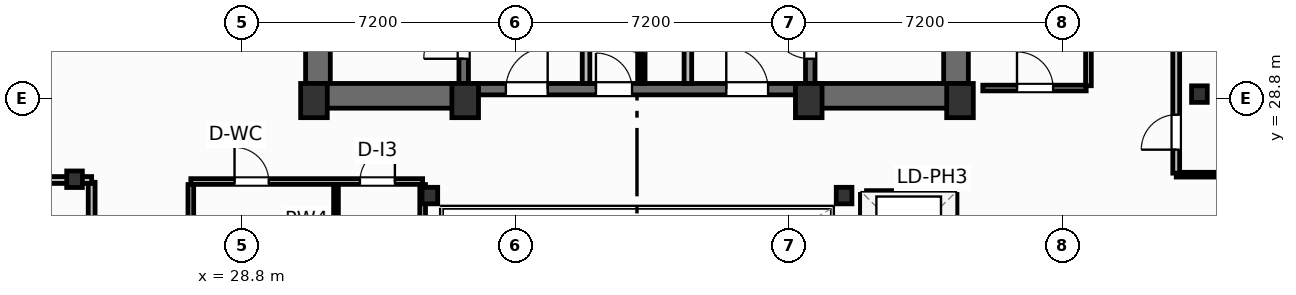
"""IFC4 building model, lengths in metres.
Left out: names, types, materials, properties, quantities, classifications, styles, units other than length and angle.
Written with IfcOpenShell. Run it as: python <this file> out.ifc"""

import sys

from ifc_helpers import new_model, si_unit, direction, frame, frame_2d, origin, origin_2d, place, context, subcontext, project, spatial, rectangle, i_section, extrude, element, fill, save


model = new_model("IFC4")
c1 = context("Model", 3, precision=1e-05, world=origin(), true_north=direction((0.0, 1.0)))
c2 = subcontext(c1, "Body", "Model", "MODEL_VIEW")
j1 = project(units=[si_unit("LENGTHUNIT", "METRE"), si_unit("PLANEANGLEUNIT", "RADIAN")], contexts=[c1])
p1 = place(None, origin())
s1 = spatial("IfcSite", under=j1, at=p1, CompositionType="ELEMENT")
p2 = place(p1, origin())
s2 = spatial("IfcBuilding", under=s1, at=p2, CompositionType="ELEMENT")
p3 = place(p2, frame((0.0, 0.0, 242.3)))
s3 = spatial("IfcBuildingStorey", under=s2, at=p3, CompositionType="ELEMENT", Elevation=242.3)
for number, where, z_axis, x_axis in (
    (1, (30.7, 28.75, 0.0), (0.0, 0.0, 1.0), (1.0, 0.0, 0.0)),
    (2, (34.68, 28.75, 0.0), (0.0, 0.0, 1.0), (1.0, 0.0, 0.0)),
    (3, (43.72, 28.75, 0.0), (0.0, 0.0, 1.0), (1.0, 0.0, 0.0)),
    (4, (47.7, 28.75, 0.0), (0.0, 0.0, 1.0), (1.0, 0.0, 0.0)),
):
    element("IfcColumn", number, at=place(p3, frame(where, z_axis=z_axis, x_axis=x_axis)), inside=s3, PredefinedType="COLUMN", context=c2, shape_type="SweptSolid", body=[
        extrude(rectangle(XDim=0.7, YDim=0.9, at=origin_2d()), origin(), (0.0, 0.0, 1.0), 3.7),
    ])
for number, where, z_axis, x_axis in (
    (5, (33.75, 26.25, 0.0), (0.0, 0.0, 1.0), (1.0, 0.0, 0.0)),
    (6, (44.65, 26.25, 0.0), (0.0, 0.0, 1.0), (1.0, 0.0, 0.0)),
    (7, (24.4, 26.68, 0.0), (0.0, 0.0, 1.0), (1.0, 0.0, 0.0)),
    (8, (54.0, 28.92, 0.0), (0.0, 0.0, 1.0), (1.0, 0.0, 0.0)),
):
    element("IfcColumn", number, at=place(p3, frame(where, z_axis=z_axis, x_axis=x_axis)), inside=s3, PredefinedType="COLUMN", context=c2, shape_type="SweptSolid", body=[
        extrude(i_section(OverallWidth=0.412, OverallDepth=0.435, WebThickness=0.036, FlangeThickness=0.057, FilletRadius=0.025, at=origin_2d()), origin(), (0.0, 0.0, 1.0), 3.7),
    ])
for number, where, z_axis, x_axis in (
    (9, (30.805, 29.2, 0.0), (0.0, 0.0, 1.0), (0.0, 1.0, 0.0)),
    (10, (47.595, 29.2, 0.0), (0.0, 0.0, 1.0), (0.0, 1.0, 0.0)),
):
    element("IfcWall", number, at=place(p3, frame(where, z_axis=z_axis, x_axis=x_axis)), inside=s3, PredefinedType="SHEAR", context=c2, shape_type="SweptSolid", body=[
        extrude(rectangle(XDim=9.22, YDim=0.65, at=frame_2d((4.61, 0.0))), origin(), (0.0, 0.0, 1.0), 3.45),
    ])
p4 = place(p3, frame((30.48, 28.875, 0.0), z_axis=(0.0, 0.0, 1.0), x_axis=(1.0, 0.0, 0.0)))
e11 = element("IfcWall", 11, at=p4, inside=s3, PredefinedType="SHEAR", context=c2, shape_type="SweptSolid", body=[
    extrude(rectangle(XDim=4.32, YDim=0.65, at=frame_2d((2.16, 0.0))), origin(), (0.0, 0.0, 1.0), 3.45),
])
p5 = place(p3, frame((43.6, 28.875, 0.0), z_axis=(0.0, 0.0, 1.0), x_axis=(1.0, 0.0, 0.0)))
e12 = element("IfcWall", 12, at=p5, inside=s3, PredefinedType="SHEAR", context=c2, shape_type="SweptSolid", body=[
    extrude(rectangle(XDim=4.32, YDim=0.65, at=frame_2d((2.16, 0.0))), origin(), (0.0, 0.0, 1.0), 3.45),
])
p6 = place(p3, frame((34.8, 29.05, 0.0), z_axis=(0.0, 0.0, 1.0), x_axis=(1.0, 0.0, 0.0)))
e13 = element("IfcWall", 13, at=p6, inside=s3, PredefinedType="SHEAR", context=c2, shape_type="SweptSolid", body=[
    extrude(rectangle(XDim=8.8, YDim=0.3, at=frame_2d((4.4, 0.0))), origin(), (0.0, 0.0, 1.0), 3.45),
])
p7 = place(p6, frame((0.95, 0.0, 0.0)))
e14 = element("IfcOpeningElement", 14, at=p7, cuts=e13, PredefinedType="OPENING", context=c2, shape_type="SweptSolid", body=[
    extrude(rectangle(XDim=1.1, YDim=2.15, at=frame_2d((0.55, 1.075))), frame((0.0, 0.16, 0.0), z_axis=(0.0, -1.0, 0.0), x_axis=(1.0, 0.0, 0.0)), (0.0, 0.0, 1.0), 0.32),
])
p8 = place(p6, frame((6.75, 0.0, 0.0)))
e15 = element("IfcOpeningElement", 15, at=p8, cuts=e13, PredefinedType="OPENING", context=c2, shape_type="SweptSolid", body=[
    extrude(rectangle(XDim=1.1, YDim=2.15, at=frame_2d((0.55, 1.075))), frame((0.0, 0.16, 0.0), z_axis=(0.0, -1.0, 0.0), x_axis=(1.0, 0.0, 0.0)), (0.0, 0.0, 1.0), 0.32),
])
p9 = place(p6, frame((3.32, 0.0, 0.0)))
e16 = element("IfcOpeningElement", 16, at=p9, cuts=e13, PredefinedType="OPENING", context=c2, shape_type="SweptSolid", body=[
    extrude(rectangle(XDim=0.95, YDim=2.15, at=frame_2d((0.475, 1.075))), frame((0.0, 0.16, 0.0), z_axis=(0.0, -1.0, 0.0), x_axis=(1.0, 0.0, 0.0)), (0.0, 0.0, 1.0), 0.32),
])
p10 = place(p3, frame((34.64, 29.2, 0.0), z_axis=(0.0, 0.0, 1.0), x_axis=(0.0, 1.0, 0.0)))
e17 = element("IfcWall", 17, at=p10, inside=s3, PredefinedType="SHEAR", context=c2, shape_type="SweptSolid", body=[
    extrude(rectangle(XDim=9.22, YDim=0.25, at=frame_2d((4.61, 0.0))), origin(), (0.0, 0.0, 1.0), 3.45),
])
p11 = place(p10, frame((0.65, 0.0, 0.0)))
e18 = element("IfcOpeningElement", 18, at=p11, cuts=e17, PredefinedType="OPENING", context=c2, shape_type="SweptSolid", body=[
    extrude(rectangle(XDim=1.05, YDim=2.15, at=frame_2d((0.525, 1.075))), frame((0.0, 0.135, 0.0), z_axis=(0.0, -1.0, 0.0), x_axis=(1.0, 0.0, 0.0)), (0.0, 0.0, 1.0), 0.27),
])
p12 = place(p3, frame((43.76, 29.2, 0.0), z_axis=(0.0, 0.0, 1.0), x_axis=(0.0, 1.0, 0.0)))
e19 = element("IfcWall", 19, at=p12, inside=s3, PredefinedType="SHEAR", context=c2, shape_type="SweptSolid", body=[
    extrude(rectangle(XDim=9.22, YDim=0.25, at=frame_2d((4.61, 0.0))), origin(), (0.0, 0.0, 1.0), 3.45),
])
p13 = place(p12, frame((0.65, 0.0, 0.0)))
e20 = element("IfcOpeningElement", 20, at=p13, cuts=e19, PredefinedType="OPENING", context=c2, shape_type="SweptSolid", body=[
    extrude(rectangle(XDim=1.05, YDim=2.15, at=frame_2d((0.525, 1.075))), frame((0.0, 0.135, 0.0), z_axis=(0.0, -1.0, 0.0), x_axis=(1.0, 0.0, 0.0)), (0.0, 0.0, 1.0), 0.27),
])
p14 = place(p3, frame((24.85, 23.03, 0.0), z_axis=(0.0, 0.0, 1.0), x_axis=(0.0, 1.0, 0.0)))
e21 = element("IfcWall", 21, at=p14, inside=s3, PredefinedType="PARTITIONING", context=c2, shape_type="SweptSolid", body=[
    extrude(rectangle(XDim=3.57, YDim=0.18, at=frame_2d((1.785, 0.0))), origin(), (0.0, 0.0, 1.0), 3.45),
])
p15 = place(p14, frame((1.5, 0.0, 0.0)))
e22 = element("IfcOpeningElement", 22, at=p15, cuts=e21, PredefinedType="OPENING", context=c2, shape_type="SweptSolid", body=[
    extrude(rectangle(XDim=0.92, YDim=2.05, at=frame_2d((0.46, 1.025))), frame((0.0, 0.1, 0.0), z_axis=(0.0, -1.0, 0.0), x_axis=(1.0, 0.0, 0.0)), (0.0, 0.0, 1.0), 0.2),
])
p16 = place(p3, frame((3.482, 26.66, 0.0), z_axis=(0.0, 0.0, 1.0), x_axis=(1.0, 0.0, 0.0)))
e23 = element("IfcWall", 23, at=p16, inside=s3, PredefinedType="PARTITIONING", context=c2, shape_type="SweptSolid", body=[
    extrude(rectangle(XDim=21.368, YDim=0.18, at=frame_2d((10.684, 0.0))), origin(), (0.0, 0.0, 1.0), 2.662),
])
p17 = place(p3, frame((53.39, 26.8, 0.0), z_axis=(0.0, 0.0, 1.0), x_axis=(1.0, 0.0, 0.0)))
e24 = element("IfcWall", 24, at=p17, inside=s3, PredefinedType="PARTITIONING", context=c2, shape_type="SweptSolid", body=[
    extrude(rectangle(XDim=20.445, YDim=0.125, at=frame_2d((10.223, 0.0))), origin(), (0.0, 0.0, 1.0), 2.739),
])
p18 = place(p3, frame((53.39, 26.84, 0.0), z_axis=(0.0, 0.0, 1.0), x_axis=(0.0, 1.0, 0.0)))
e25 = element("IfcWall", 25, at=p18, inside=s3, PredefinedType="PARTITIONING", context=c2, shape_type="SweptSolid", body=[
    extrude(rectangle(XDim=12.46, YDim=0.18, at=frame_2d((6.23, 0.0))), origin(), (0.0, 0.0, 1.0), 3.45),
])
p19 = place(p18, frame((0.618, 0.0, 0.0)))
e26 = element("IfcOpeningElement", 26, at=p19, cuts=e25, PredefinedType="OPENING", context=c2, shape_type="SweptSolid", body=[
    extrude(rectangle(XDim=0.92, YDim=2.05, at=frame_2d((0.46, 1.025))), frame((0.0, 0.1, 0.0), z_axis=(0.0, -1.0, 0.0), x_axis=(1.0, 0.0, 0.0)), (0.0, 0.0, 1.0), 0.2),
])
for number, where, z_axis, x_axis in (
    (27, (37.86, 29.2, 0.0), (0.0, 0.0, 1.0), (0.0, 1.0, 0.0)),
    (28, (40.54, 29.2, 0.0), (0.0, 0.0, 1.0), (0.0, 1.0, 0.0)),
):
    element("IfcWall", number, at=place(p3, frame(where, z_axis=z_axis, x_axis=x_axis)), inside=s3, PredefinedType="PARTITIONING", context=c2, shape_type="SweptSolid", body=[
        extrude(rectangle(XDim=5.18, YDim=0.2, at=frame_2d((2.59, 0.0))), origin(), (0.0, 0.0, 1.0), 3.45),
    ])
p20 = place(p3, frame((39.35, 29.2, 0.0), z_axis=(0.0, 0.0, 1.0), x_axis=(0.0, 1.0, 0.0)))
e29 = element("IfcWall", 29, at=p20, inside=s3, PredefinedType="PARTITIONING", context=c2, shape_type="SweptSolid", body=[
    extrude(rectangle(XDim=5.22, YDim=0.125, at=frame_2d((2.61, 0.0))), origin(), (0.0, 0.0, 1.0), 3.45),
])
p21 = place(p20, frame((0.8, 0.0, 0.0)))
e30 = element("IfcOpeningElement", 30, at=p21, cuts=e29, PredefinedType="OPENING", context=c2, shape_type="SweptSolid", body=[
    extrude(rectangle(XDim=0.85, YDim=2.05, at=frame_2d((0.425, 1.025))), frame((0.0, 0.073, 0.0), z_axis=(0.0, -1.0, 0.0), x_axis=(1.0, 0.0, 0.0)), (0.0, 0.0, 1.0), 0.145),
])
p22 = place(p20, frame((3.4, 0.0, 0.0)))
e31 = element("IfcOpeningElement", 31, at=p22, cuts=e29, PredefinedType="OPENING", context=c2, shape_type="SweptSolid", body=[
    extrude(rectangle(XDim=0.85, YDim=2.05, at=frame_2d((0.425, 1.025))), frame((0.0, 0.073, 0.0), z_axis=(0.0, -1.0, 0.0), x_axis=(1.0, 0.0, 0.0)), (0.0, 0.0, 1.0), 0.145),
])
p23 = place(p3, frame((27.46, 26.62, 0.0), z_axis=(0.0, 0.0, 1.0), x_axis=(1.0, 0.0, 0.0)))
e32 = element("IfcWall", 32, at=p23, inside=s3, PredefinedType="PARTITIONING", context=c2, shape_type="SweptSolid", body=[
    extrude(rectangle(XDim=6.1, YDim=0.15, at=frame_2d((3.05, 0.0))), origin(), (0.0, 0.0, 1.0), 2.662),
])
p24 = place(p23, frame((1.15, 0.0, 0.0)))
e33 = element("IfcOpeningElement", 33, at=p24, cuts=e32, PredefinedType="OPENING", context=c2, shape_type="SweptSolid", body=[
    extrude(rectangle(XDim=0.9, YDim=2.05, at=frame_2d((0.45, 1.025))), frame((0.0, 0.085, 0.0), z_axis=(0.0, -1.0, 0.0), x_axis=(1.0, 0.0, 0.0)), (0.0, 0.0, 1.0), 0.17),
])
p25 = place(p23, frame((4.45, 0.0, 0.0)))
e34 = element("IfcOpeningElement", 34, at=p25, cuts=e32, PredefinedType="OPENING", context=c2, shape_type="SweptSolid", body=[
    extrude(rectangle(XDim=0.92, YDim=2.05, at=frame_2d((0.46, 1.025))), frame((0.0, 0.085, 0.0), z_axis=(0.0, -1.0, 0.0), x_axis=(1.0, 0.0, 0.0)), (0.0, 0.0, 1.0), 0.17),
])
p26 = place(p3, frame((31.28, 19.38, 0.0), z_axis=(0.0, 0.0, 1.0), x_axis=(0.0, 1.0, 0.0)))
e35 = element("IfcWall", 35, at=p26, inside=s3, PredefinedType="PARTITIONING", context=c2, shape_type="SweptSolid", body=[
    extrude(rectangle(XDim=7.16, YDim=0.125, at=frame_2d((3.58, 0.0))), origin(), (0.0, 0.0, 1.0), 3.45),
])
p27 = place(p3, frame((27.46, 19.38, 0.0), z_axis=(0.0, 0.0, 1.0), x_axis=(0.0, 1.0, 0.0)))
e36 = element("IfcWall", 36, at=p27, inside=s3, PredefinedType="PARTITIONING", context=c2, shape_type="SweptSolid", body=[
    extrude(rectangle(XDim=7.16, YDim=0.15, at=frame_2d((3.58, 0.0))), origin(), (0.0, 0.0, 1.0), 3.45),
])
p28 = place(p27, frame((1.4, 0.0, 0.0)))
e37 = element("IfcOpeningElement", 37, at=p28, cuts=e36, PredefinedType="OPENING", context=c2, shape_type="SweptSolid", body=[
    extrude(rectangle(XDim=0.95, YDim=2.05, at=frame_2d((0.475, 1.025))), frame((0.0, 0.085, 0.0), z_axis=(0.0, -1.0, 0.0), x_axis=(1.0, 0.0, 0.0)), (0.0, 0.0, 1.0), 0.17),
])
p29 = place(p3, frame((33.56, 19.38, 0.0), z_axis=(0.0, 0.0, 1.0), x_axis=(0.0, 1.0, 0.0)))
e38 = element("IfcWall", 38, at=p29, inside=s3, PredefinedType="PARTITIONING", context=c2, shape_type="SweptSolid", body=[
    extrude(rectangle(XDim=7.16, YDim=0.15, at=frame_2d((3.58, 0.0))), origin(), (0.0, 0.0, 1.0), 2.824),
])
p30 = place(p3, frame((48.3, 29.08, 0.0), z_axis=(0.0, 0.0, 1.0), x_axis=(1.0, 0.0, 0.0)))
e39 = element("IfcWall", 39, at=p30, inside=s3, PredefinedType="PARTITIONING", context=c2, shape_type="SweptSolid", body=[
    extrude(rectangle(XDim=2.72, YDim=0.15, at=frame_2d((1.36, 0.0))), origin(), (0.0, 0.0, 1.0), 2.662),
])
p31 = place(p30, frame((0.9, 0.0, 0.0)))
e40 = element("IfcOpeningElement", 40, at=p31, cuts=e39, PredefinedType="OPENING", context=c2, shape_type="SweptSolid", body=[
    extrude(rectangle(XDim=0.95, YDim=2.05, at=frame_2d((0.475, 1.025))), frame((0.0, 0.085, 0.0), z_axis=(0.0, -1.0, 0.0), x_axis=(1.0, 0.0, 0.0)), (0.0, 0.0, 1.0), 0.17),
])
p32 = place(p3, frame((51.08, 29.14, 0.0), z_axis=(0.0, 0.0, 1.0), x_axis=(0.0, 1.0, 0.0)))
e41 = element("IfcWall", 41, at=p32, inside=s3, PredefinedType="PARTITIONING", context=c2, shape_type="SweptSolid", body=[
    extrude(rectangle(XDim=4.69, YDim=0.15, at=frame_2d((2.345, 0.0))), origin(), (0.0, 0.0, 1.0), 3.45),
])
p33 = place(p3, frame((45.24, 26.28, 0.0), z_axis=(0.0, 0.0, 1.0), x_axis=(1.0, 0.0, 0.0)))
e42 = element("IfcWall", 42, at=p33, inside=s3, PredefinedType="PARTITIONING", context=c2, shape_type="SweptSolid", body=[
    extrude(rectangle(XDim=2.22, YDim=0.2, at=frame_2d((1.11, 0.0))), origin(), (0.0, 0.0, 1.0), 3.45),
])
p34 = place(p3, frame((45.18, 19.38, 0.0), z_axis=(0.0, 0.0, 1.0), x_axis=(0.0, 1.0, 0.0)))
e43 = element("IfcWall", 43, at=p34, inside=s3, PredefinedType="PARTITIONING", context=c2, shape_type="SweptSolid", body=[
    extrude(rectangle(XDim=6.9, YDim=0.2, at=frame_2d((3.45, 0.0))), origin(), (0.0, 0.0, 1.0), 3.45),
])
p35 = place(p3, frame((47.52, 19.38, 0.0), z_axis=(0.0, 0.0, 1.0), x_axis=(0.0, 1.0, 0.0)))
e44 = element("IfcWall", 44, at=p35, inside=s3, PredefinedType="PARTITIONING", context=c2, shape_type="SweptSolid", body=[
    extrude(rectangle(XDim=6.9, YDim=0.2, at=frame_2d((3.45, 0.0))), origin(), (0.0, 0.0, 1.0), 3.45),
])
p36 = place(p35, frame((0.59, 0.0, 0.0)))
e45 = element("IfcOpeningElement", 45, at=p36, cuts=e44, PredefinedType="OPENING", context=c2, shape_type="SweptSolid", body=[
    extrude(rectangle(XDim=1.1, YDim=2.15, at=frame_2d((0.55, 1.075))), frame((0.0, 0.11, 0.0), z_axis=(0.0, -1.0, 0.0), x_axis=(1.0, 0.0, 0.0)), (0.0, 0.0, 1.0), 0.22),
])
p37 = place(p35, frame((2.89, 0.0, 0.0)))
e46 = element("IfcOpeningElement", 46, at=p37, cuts=e44, PredefinedType="OPENING", context=c2, shape_type="SweptSolid", body=[
    extrude(rectangle(XDim=1.1, YDim=2.15, at=frame_2d((0.55, 1.075))), frame((0.0, 0.11, 0.0), z_axis=(0.0, -1.0, 0.0), x_axis=(1.0, 0.0, 0.0)), (0.0, 0.0, 1.0), 0.22),
])
p38 = place(p35, frame((5.19, 0.0, 0.0)))
e47 = element("IfcOpeningElement", 47, at=p38, cuts=e44, PredefinedType="OPENING", context=c2, shape_type="SweptSolid", body=[
    extrude(rectangle(XDim=1.1, YDim=2.15, at=frame_2d((0.55, 1.075))), frame((0.0, 0.11, 0.0), z_axis=(0.0, -1.0, 0.0), x_axis=(1.0, 0.0, 0.0)), (0.0, 0.0, 1.0), 0.22),
])
p39 = place(p19, origin())
e48 = element("IfcDoor", 48, at=p39, inside=s3, OperationType="SINGLE_SWING_LEFT", PredefinedType="DOOR", context=c2, shape_type="SweptSolid", body=[
    extrude(rectangle(XDim=0.92, YDim=2.05, at=frame_2d((0.46, 1.025))), frame((0.0, 0.025, 0.0), z_axis=(0.0, -1.0, 0.0), x_axis=(1.0, 0.0, 0.0)), (0.0, 0.0, 1.0), 0.05),
])
fill(e26, e48)
p40 = place(p11, origin())
e49 = element("IfcDoor", 49, at=p40, inside=s3, OperationType="SINGLE_SWING_LEFT", PredefinedType="DOOR", context=c2, shape_type="SweptSolid", body=[
    extrude(rectangle(XDim=1.05, YDim=2.15, at=frame_2d((0.525, 1.075))), frame((0.0, 0.025, 0.0), z_axis=(0.0, -1.0, 0.0), x_axis=(1.0, 0.0, 0.0)), (0.0, 0.0, 1.0), 0.05),
])
fill(e18, e49)
p41 = place(p13, origin())
e50 = element("IfcDoor", 50, at=p41, inside=s3, OperationType="SINGLE_SWING_RIGHT", PredefinedType="DOOR", context=c2, shape_type="SweptSolid", body=[
    extrude(rectangle(XDim=1.05, YDim=2.15, at=frame_2d((0.525, 1.075))), frame((0.0, 0.025, 0.0), z_axis=(0.0, -1.0, 0.0), x_axis=(1.0, 0.0, 0.0)), (0.0, 0.0, 1.0), 0.05),
])
fill(e20, e50)
p42 = place(p7, origin())
e51 = element("IfcDoor", 51, at=p42, inside=s3, OperationType="SINGLE_SWING_RIGHT", PredefinedType="DOOR", context=c2, shape_type="SweptSolid", body=[
    extrude(rectangle(XDim=1.1, YDim=2.15, at=frame_2d((0.55, 1.075))), frame((0.0, 0.025, 0.0), z_axis=(0.0, -1.0, 0.0), x_axis=(1.0, 0.0, 0.0)), (0.0, 0.0, 1.0), 0.05),
])
fill(e14, e51)
p43 = place(p8, origin())
e52 = element("IfcDoor", 52, at=p43, inside=s3, OperationType="SINGLE_SWING_LEFT", PredefinedType="DOOR", context=c2, shape_type="SweptSolid", body=[
    extrude(rectangle(XDim=1.1, YDim=2.15, at=frame_2d((0.55, 1.075))), frame((0.0, 0.025, 0.0), z_axis=(0.0, -1.0, 0.0), x_axis=(1.0, 0.0, 0.0)), (0.0, 0.0, 1.0), 0.05),
])
fill(e15, e52)
p44 = place(p21, origin())
e53 = element("IfcDoor", 53, at=p44, inside=s3, OperationType="SINGLE_SWING_RIGHT", PredefinedType="DOOR", context=c2, shape_type="SweptSolid", body=[
    extrude(rectangle(XDim=0.85, YDim=2.05, at=frame_2d((0.425, 1.025))), frame((0.0, 0.025, 0.0), z_axis=(0.0, -1.0, 0.0), x_axis=(1.0, 0.0, 0.0)), (0.0, 0.0, 1.0), 0.05),
])
fill(e30, e53)
p45 = place(p9, origin())
e54 = element("IfcDoor", 54, at=p45, inside=s3, OperationType="SINGLE_SWING_LEFT", PredefinedType="DOOR", context=c2, shape_type="SweptSolid", body=[
    extrude(rectangle(XDim=0.95, YDim=2.15, at=frame_2d((0.475, 1.075))), frame((0.0, 0.025, 0.0), z_axis=(0.0, -1.0, 0.0), x_axis=(1.0, 0.0, 0.0)), (0.0, 0.0, 1.0), 0.05),
])
fill(e16, e54)
p46 = place(p24, origin())
e55 = element("IfcDoor", 55, at=p46, inside=s3, OperationType="SINGLE_SWING_LEFT", PredefinedType="DOOR", context=c2, shape_type="SweptSolid", body=[
    extrude(rectangle(XDim=0.9, YDim=2.05, at=frame_2d((0.45, 1.025))), frame((0.0, 0.025, 0.0), z_axis=(0.0, -1.0, 0.0), x_axis=(1.0, 0.0, 0.0)), (0.0, 0.0, 1.0), 0.05),
])
fill(e33, e55)
p47 = place(p25, origin())
e56 = element("IfcDoor", 56, at=p47, inside=s3, OperationType="SINGLE_SWING_RIGHT", PredefinedType="DOOR", context=c2, shape_type="SweptSolid", body=[
    extrude(rectangle(XDim=0.92, YDim=2.05, at=frame_2d((0.46, 1.025))), frame((0.0, 0.025, 0.0), z_axis=(0.0, -1.0, 0.0), x_axis=(1.0, 0.0, 0.0)), (0.0, 0.0, 1.0), 0.05),
])
fill(e34, e56)
p48 = place(p31, origin())
e57 = element("IfcDoor", 57, at=p48, inside=s3, OperationType="SINGLE_SWING_LEFT", PredefinedType="DOOR", context=c2, shape_type="SweptSolid", body=[
    extrude(rectangle(XDim=0.95, YDim=2.05, at=frame_2d((0.475, 1.025))), frame((0.0, 0.025, 0.0), z_axis=(0.0, -1.0, 0.0), x_axis=(1.0, 0.0, 0.0)), (0.0, 0.0, 1.0), 0.05),
])
fill(e40, e57)
save(model, sys.argv[1])
